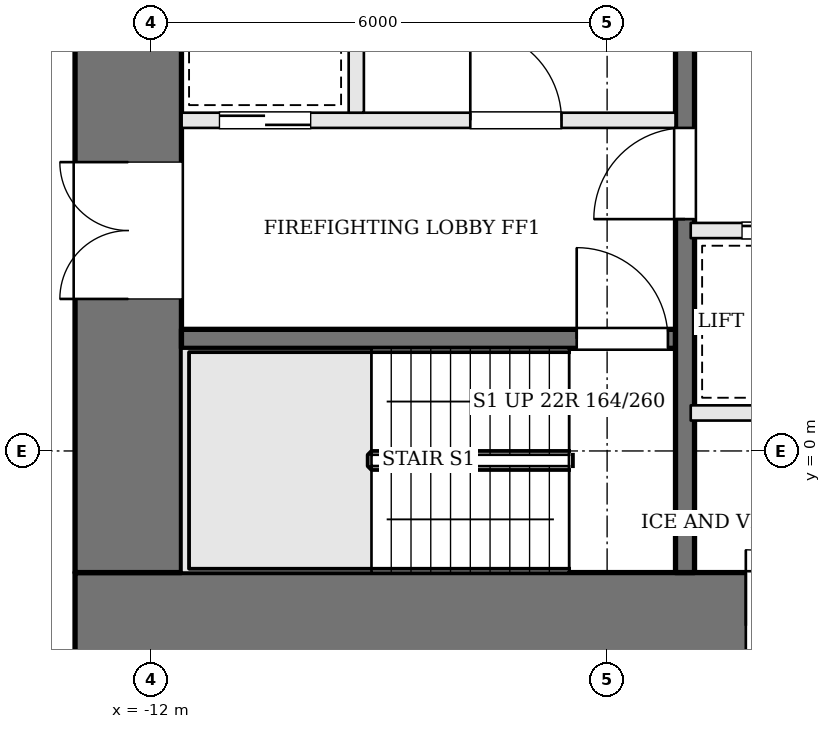
"""IFC4 building model, lengths in metres.
Left out: names, types, materials, properties, quantities, classifications, styles, units other than length and angle.
Written with IfcOpenShell. Run it as: python <this file> out.ifc"""

import sys

from ifc_helpers import new_model, si_unit, direction, frame, frame_2d, origin, place, context, subcontext, project, spatial, rectangle, extrude, element, fill, save


model = new_model("IFC4")
c1 = context("Model", 3, precision=1e-05, world=origin(), true_north=direction((0.0, 1.0)))
c2 = subcontext(c1, "Body", "Model", "MODEL_VIEW")
j1 = project(units=[si_unit("LENGTHUNIT", "METRE"), si_unit("PLANEANGLEUNIT", "RADIAN")], contexts=[c1])
p1 = place(None, origin())
s1 = spatial("IfcSite", under=j1, at=p1, CompositionType="ELEMENT")
p2 = place(p1, origin())
s2 = spatial("IfcBuilding", under=s1, at=p2, CompositionType="ELEMENT")
p3 = place(p2, frame((0.0, 0.0, 66.3)))
s3 = spatial("IfcBuildingStorey", under=s2, at=p3, CompositionType="ELEMENT", Elevation=66.3)
p4 = place(p3, frame((-13.0, -2.3, 0.0), z_axis=(0.0, 0.0, 1.0), x_axis=(1.0, 0.0, 0.0)))
e1 = element("IfcWall", 1, at=p4, inside=s3, PredefinedType="SHEAR", context=c2, shape_type="SweptSolid", body=[
    extrude(rectangle(XDim=26.0, YDim=1.4, at=frame_2d((13.0, 0.0))), origin(), (0.0, 0.0, 1.0), 3.6),
])
p5 = place(p4, frame((8.825, 0.0, 0.0)))
e2 = element("IfcOpeningElement", 2, at=p5, cuts=e1, PredefinedType="OPENING", context=c2, shape_type="SweptSolid", body=[
    extrude(rectangle(XDim=1.0, YDim=2.1, at=frame_2d((0.5, 1.05))), frame((0.0, 0.71, 0.0), z_axis=(0.0, -1.0, 0.0), x_axis=(1.0, 0.0, 0.0)), (0.0, 0.0, 1.0), 1.42),
])
p6 = place(p4, frame((11.025, 0.0, 0.0)))
e3 = element("IfcOpeningElement", 3, at=p6, cuts=e1, PredefinedType="OPENING", context=c2, shape_type="SweptSolid", body=[
    extrude(rectangle(XDim=0.7, YDim=2.1, at=frame_2d((0.35, 1.05))), frame((0.0, 0.71, 0.0), z_axis=(0.0, -1.0, 0.0), x_axis=(1.0, 0.0, 0.0)), (0.0, 0.0, 1.0), 1.42),
])
p7 = place(p4, frame((12.925, 0.0, 0.0)))
e4 = element("IfcOpeningElement", 4, at=p7, cuts=e1, PredefinedType="OPENING", context=c2, shape_type="SweptSolid", body=[
    extrude(rectangle(XDim=1.0, YDim=2.1, at=frame_2d((0.5, 1.05))), frame((0.0, 0.71, 0.0), z_axis=(0.0, -1.0, 0.0), x_axis=(1.0, 0.0, 0.0)), (0.0, 0.0, 1.0), 1.42),
])
p8 = place(p4, frame((15.775, 0.0, 0.0)))
e5 = element("IfcOpeningElement", 5, at=p8, cuts=e1, PredefinedType="OPENING", context=c2, shape_type="SweptSolid", body=[
    extrude(rectangle(XDim=1.0, YDim=2.1, at=frame_2d((0.5, 1.05))), frame((0.0, 0.71, 0.0), z_axis=(0.0, -1.0, 0.0), x_axis=(1.0, 0.0, 0.0)), (0.0, 0.0, 1.0), 1.42),
])
p9 = place(p3, frame((-12.3, -1.6, 0.0), z_axis=(0.0, 0.0, 1.0), x_axis=(0.0, 1.0, 0.0)))
e6 = element("IfcWall", 6, at=p9, inside=s3, PredefinedType="SHEAR", context=c2, shape_type="SweptSolid", body=[
    extrude(rectangle(XDim=12.2, YDim=1.4, at=frame_2d((6.1, 0.0))), origin(), (0.0, 0.0, 1.0), 3.6),
])
p10 = place(p9, frame((3.6, 0.0, 0.0)))
e7 = element("IfcOpeningElement", 7, at=p10, cuts=e6, PredefinedType="OPENING", context=c2, shape_type="SweptSolid", body=[
    extrude(rectangle(XDim=1.8, YDim=2.1, at=frame_2d((0.9, 1.05))), frame((0.0, 0.71, 0.0), z_axis=(0.0, -1.0, 0.0), x_axis=(1.0, 0.0, 0.0)), (0.0, 0.0, 1.0), 1.42),
])
p11 = place(p3, frame((-11.6, 1.475, 0.0), z_axis=(0.0, 0.0, 1.0), x_axis=(1.0, 0.0, 0.0)))
e8 = element("IfcWall", 8, at=p11, inside=s3, PredefinedType="SOLIDWALL", context=c2, shape_type="SweptSolid", body=[
    extrude(rectangle(XDim=6.5, YDim=0.25, at=frame_2d((3.25, 0.0))), origin(), (0.0, 0.0, 1.0), 3.4),
])
p12 = place(p11, frame((5.2, 0.0, 0.0)))
e9 = element("IfcOpeningElement", 9, at=p12, cuts=e8, PredefinedType="OPENING", context=c2, shape_type="SweptSolid", body=[
    extrude(rectangle(XDim=1.2, YDim=2.1, at=frame_2d((0.6, 1.05))), frame((0.0, 0.135, 0.0), z_axis=(0.0, -1.0, 0.0), x_axis=(1.0, 0.0, 0.0)), (0.0, 0.0, 1.0), 0.27),
])
p13 = place(p3, frame((-11.6, 4.35, 0.0), z_axis=(0.0, 0.0, 1.0), x_axis=(1.0, 0.0, 0.0)))
e10 = element("IfcWall", 10, at=p13, inside=s3, PredefinedType="SOLIDWALL", context=c2, shape_type="SweptSolid", body=[
    extrude(rectangle(XDim=6.5, YDim=0.2, at=frame_2d((3.25, 0.0))), origin(), (0.0, 0.0, 1.0), 3.4),
])
p14 = place(p13, frame((3.8, 0.0, 0.0)))
e11 = element("IfcOpeningElement", 11, at=p14, cuts=e10, PredefinedType="OPENING", context=c2, shape_type="SweptSolid", body=[
    extrude(rectangle(XDim=1.2, YDim=2.1, at=frame_2d((0.6, 1.05))), frame((0.0, 0.11, 0.0), z_axis=(0.0, -1.0, 0.0), x_axis=(1.0, 0.0, 0.0)), (0.0, 0.0, 1.0), 0.22),
])
p15 = place(p13, frame((0.5, 0.0, 0.0)))
e12 = element("IfcOpeningElement", 12, at=p15, cuts=e10, PredefinedType="OPENING", context=c2, shape_type="SweptSolid", body=[
    extrude(rectangle(XDim=1.2, YDim=2.1, at=frame_2d((0.6, 1.05))), frame((0.0, 0.11, 0.0), z_axis=(0.0, -1.0, 0.0), x_axis=(1.0, 0.0, 0.0)), (0.0, 0.0, 1.0), 0.22),
])
p16 = place(p3, frame((-9.3, 4.45, 0.0), z_axis=(0.0, 0.0, 1.0), x_axis=(0.0, 1.0, 0.0)))
e13 = element("IfcWall", 13, at=p16, inside=s3, PredefinedType="SOLIDWALL", context=c2, shape_type="SweptSolid", body=[
    extrude(rectangle(XDim=3.0, YDim=0.2, at=frame_2d((1.5, 0.0))), origin(), (0.0, 0.0, 1.0), 3.4),
])
p17 = place(p3, frame((-4.975, -1.6, 0.0), z_axis=(0.0, 0.0, 1.0), x_axis=(0.0, 1.0, 0.0)))
e14 = element("IfcWall", 14, at=p17, inside=s3, PredefinedType="SOLIDWALL", context=c2, shape_type="SweptSolid", body=[
    extrude(rectangle(XDim=12.2, YDim=0.25, at=frame_2d((6.1, 0.0))), origin(), (0.0, 0.0, 1.0), 3.4),
])
p18 = place(p17, frame((4.65, 0.0, 0.0)))
e15 = element("IfcOpeningElement", 15, at=p18, cuts=e14, PredefinedType="OPENING", context=c2, shape_type="SweptSolid", body=[
    extrude(rectangle(XDim=1.2, YDim=2.1, at=frame_2d((0.6, 1.05))), frame((0.0, 0.135, 0.0), z_axis=(0.0, -1.0, 0.0), x_axis=(1.0, 0.0, 0.0)), (0.0, 0.0, 1.0), 0.27),
])
p19 = place(p3, frame((-4.9, 0.5, 0.0), z_axis=(0.0, 0.0, 1.0), x_axis=(1.0, 0.0, 0.0)))
e16 = element("IfcWall", 16, at=p19, inside=s3, PredefinedType="SOLIDWALL", context=c2, shape_type="SweptSolid", body=[
    extrude(rectangle(XDim=9.8, YDim=0.2, at=frame_2d((4.9, 0.0))), origin(), (0.0, 0.0, 1.0), 3.4),
])
p20 = place(p3, frame((-4.9, 2.9, 0.0), z_axis=(0.0, 0.0, 1.0), x_axis=(1.0, 0.0, 0.0)))
e17 = element("IfcWall", 17, at=p20, inside=s3, PredefinedType="SOLIDWALL", context=c2, shape_type="SweptSolid", body=[
    extrude(rectangle(XDim=9.8, YDim=0.2, at=frame_2d((4.9, 0.0))), origin(), (0.0, 0.0, 1.0), 3.4),
])
p21 = place(p20, frame((0.675, 0.0, 0.0)))
e18 = element("IfcOpeningElement", 18, at=p21, cuts=e17, PredefinedType="OPENING", context=c2, shape_type="SweptSolid", body=[
    extrude(rectangle(XDim=1.1, YDim=2.1, at=frame_2d((0.55, 1.05))), frame((0.0, 0.11, 0.0), z_axis=(0.0, -1.0, 0.0), x_axis=(1.0, 0.0, 0.0)), (0.0, 0.0, 1.0), 0.22),
])
p22 = place(p20, frame((3.125, 0.0, 0.0)))
e19 = element("IfcOpeningElement", 19, at=p22, cuts=e17, PredefinedType="OPENING", context=c2, shape_type="SweptSolid", body=[
    extrude(rectangle(XDim=1.1, YDim=2.1, at=frame_2d((0.55, 1.05))), frame((0.0, 0.11, 0.0), z_axis=(0.0, -1.0, 0.0), x_axis=(1.0, 0.0, 0.0)), (0.0, 0.0, 1.0), 0.22),
])
p23 = place(p10, origin())
e20 = element("IfcDoor", 20, at=p23, inside=s3, OperationType="DOUBLE_DOOR_SINGLE_SWING", PredefinedType="DOOR", context=c2, shape_type="SweptSolid", body=[
    extrude(rectangle(XDim=1.8, YDim=2.1, at=frame_2d((0.9, 1.05))), frame((0.0, 0.025, 0.0), z_axis=(0.0, -1.0, 0.0), x_axis=(1.0, 0.0, 0.0)), (0.0, 0.0, 1.0), 0.05),
])
fill(e7, e20)
p24 = place(p18, origin())
e21 = element("IfcDoor", 21, at=p24, inside=s3, OperationType="SINGLE_SWING_LEFT", PredefinedType="DOOR", context=c2, shape_type="SweptSolid", body=[
    extrude(rectangle(XDim=1.2, YDim=2.1, at=frame_2d((0.6, 1.05))), frame((0.0, 0.025, 0.0), z_axis=(0.0, -1.0, 0.0), x_axis=(1.0, 0.0, 0.0)), (0.0, 0.0, 1.0), 0.05),
])
fill(e15, e21)
p25 = place(p14, origin())
e22 = element("IfcDoor", 22, at=p25, inside=s3, OperationType="SINGLE_SWING_LEFT", PredefinedType="DOOR", context=c2, shape_type="SweptSolid", body=[
    extrude(rectangle(XDim=1.2, YDim=2.1, at=frame_2d((0.6, 1.05))), frame((0.0, 0.025, 0.0), z_axis=(0.0, -1.0, 0.0), x_axis=(1.0, 0.0, 0.0)), (0.0, 0.0, 1.0), 0.05),
])
fill(e11, e22)
p26 = place(p12, origin())
e23 = element("IfcDoor", 23, at=p26, inside=s3, OperationType="SINGLE_SWING_LEFT", PredefinedType="DOOR", context=c2, shape_type="SweptSolid", body=[
    extrude(rectangle(XDim=1.2, YDim=2.1, at=frame_2d((0.6, 1.05))), frame((0.0, 0.025, 0.0), z_axis=(0.0, -1.0, 0.0), x_axis=(1.0, 0.0, 0.0)), (0.0, 0.0, 1.0), 0.05),
])
fill(e9, e23)
p27 = place(p15, origin())
e24 = element("IfcDoor", 24, at=p27, inside=s3, OperationType="SLIDING_TO_RIGHT", PredefinedType="DOOR", context=c2, shape_type="SweptSolid", body=[
    extrude(rectangle(XDim=1.2, YDim=2.1, at=frame_2d((0.6, 1.05))), frame((0.0, 0.025, 0.0), z_axis=(0.0, -1.0, 0.0), x_axis=(1.0, 0.0, 0.0)), (0.0, 0.0, 1.0), 0.05),
])
fill(e12, e24)
p28 = place(p21, origin())
e25 = element("IfcDoor", 25, at=p28, inside=s3, OperationType="SLIDING_TO_RIGHT", PredefinedType="DOOR", context=c2, shape_type="SweptSolid", body=[
    extrude(rectangle(XDim=1.1, YDim=2.1, at=frame_2d((0.55, 1.05))), frame((0.0, 0.025, 0.0), z_axis=(0.0, -1.0, 0.0), x_axis=(1.0, 0.0, 0.0)), (0.0, 0.0, 1.0), 0.05),
])
fill(e18, e25)
p29 = place(p5, origin())
e26 = element("IfcDoor", 26, at=p29, inside=s3, OperationType="SINGLE_SWING_LEFT", PredefinedType="DOOR", context=c2, shape_type="SweptSolid", body=[
    extrude(rectangle(XDim=1.0, YDim=2.1, at=frame_2d((0.5, 1.05))), frame((0.0, 0.025, 0.0), z_axis=(0.0, -1.0, 0.0), x_axis=(1.0, 0.0, 0.0)), (0.0, 0.0, 1.0), 0.05),
])
fill(e2, e26)
save(model, sys.argv[1])
